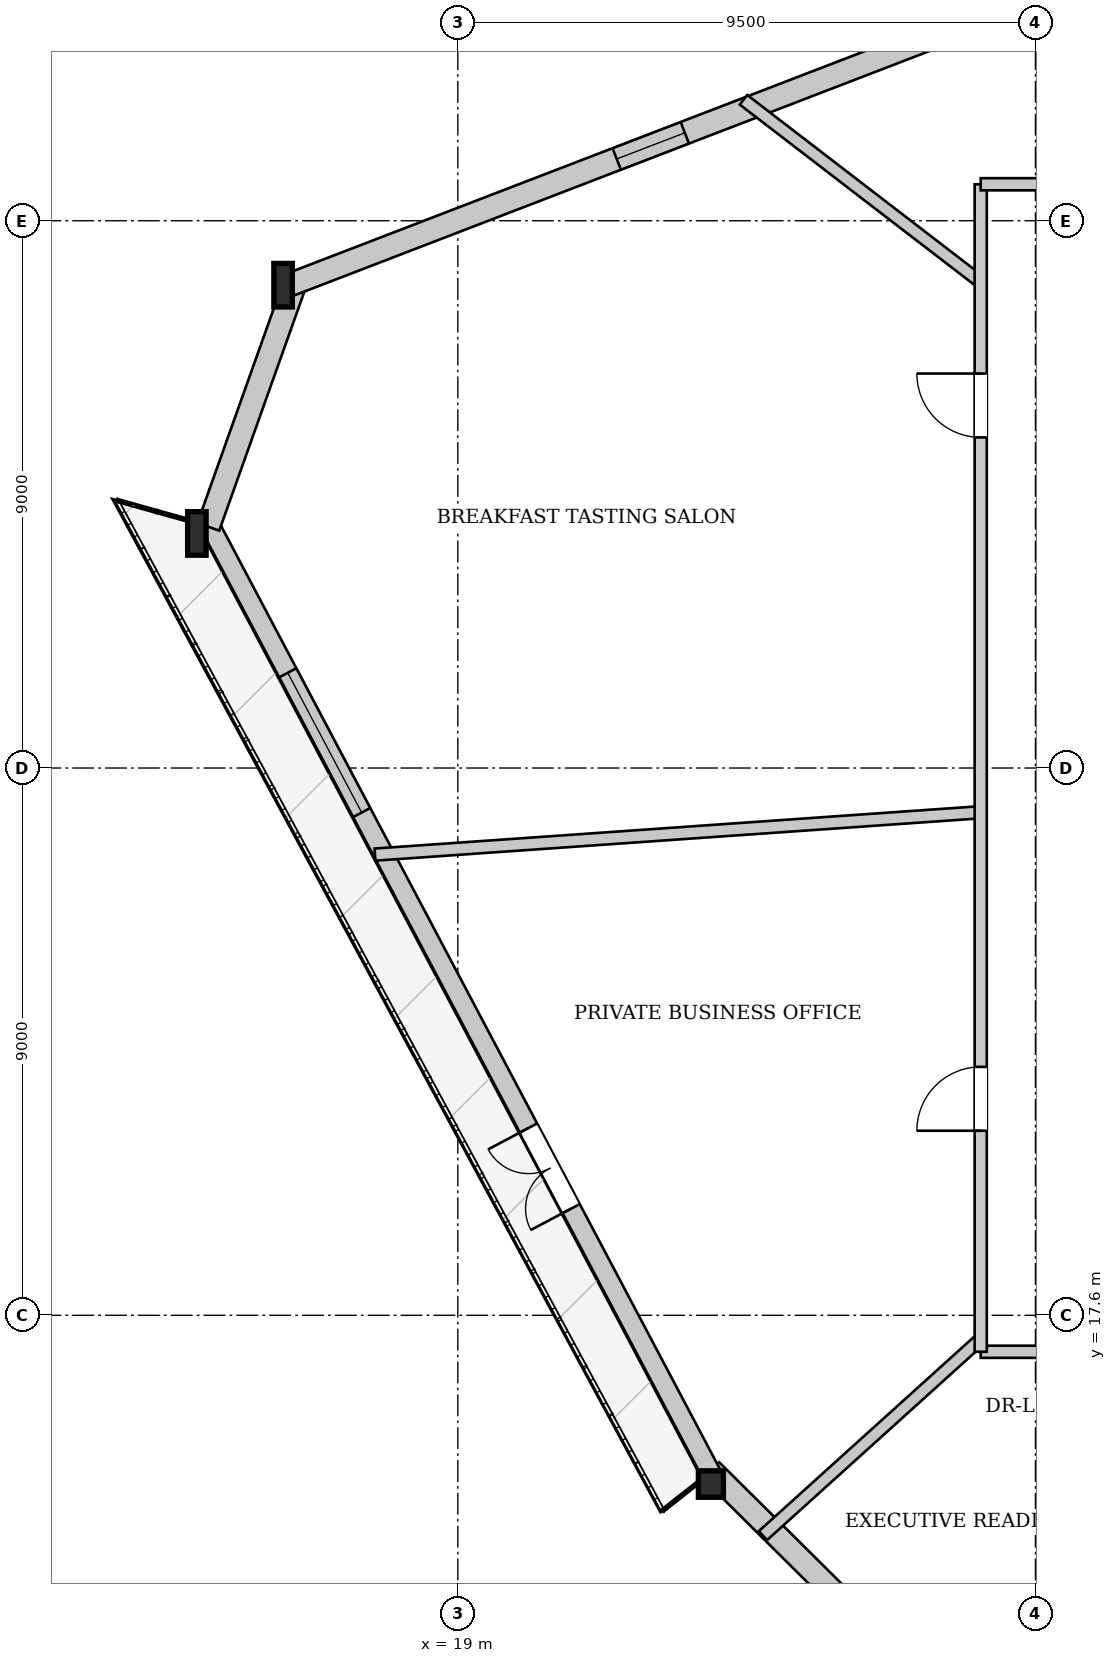
"""IFC4 building model, lengths in metres.
Left out: names, types, materials, properties, quantities, classifications, styles, units other than length and angle.
Written with IfcOpenShell. Run it as: python <this file> out.ifc"""

import sys

from ifc_helpers import new_model, si_unit, direction, frame, frame_2d, origin, origin_2d, place, context, subcontext, project, spatial, rectangle, i_section, extrude, source, transform, mapped, element, fill, save


model = new_model("IFC4")
c1 = context("Model", 3, precision=1e-05, world=origin(), true_north=direction((0.0, 1.0)))
c2 = subcontext(c1, "Body", "Model", "MODEL_VIEW")
j1 = project(units=[si_unit("LENGTHUNIT", "METRE"), si_unit("PLANEANGLEUNIT", "RADIAN")], contexts=[c1])
p1 = place(None, origin())
s1 = spatial("IfcSite", under=j1, at=p1, CompositionType="ELEMENT")
p2 = place(p1, origin())
s2 = spatial("IfcBuilding", under=s1, at=p2, CompositionType="ELEMENT")
p3 = place(p2, frame((0.0, 0.0, 189.2)))
s3 = spatial("IfcBuildingStorey", under=s2, at=p3, CompositionType="ELEMENT", Elevation=189.2)
m1 = source(origin(), c2, "Body", "SweptSolid", [
    extrude(i_section(OverallWidth=0.412, OverallDepth=0.435, WebThickness=0.031, FlangeThickness=0.05, at=origin_2d()), origin(), (0.0, 0.0, 1.0), 3.397),
])
p4 = place(p3, frame((26.763, 38.8, 0.0), z_axis=(-0.050587437703, -0.069485869686, 0.996299465553), x_axis=(0.808446763279, -0.58856930853, 0.0)))
e1 = element("IfcColumn", 1, at=p4, inside=s3, PredefinedType="COLUMN", context=c2, shape_type="MappedRepresentation", body=[
    mapped(m1, transform((0.0, 0.0, 0.0), x_axis=(1.0, 0.0, 0.0), y_axis=(0.0, 1.0, 0.0), z_axis=(0.0, 0.0, 1.0), scale=1.0)),
])
m2 = source(origin(), c2, "Body", "SweptSolid", [
    extrude(i_section(OverallWidth=0.304, OverallDepth=0.716, WebThickness=0.021, FlangeThickness=0.04, at=origin_2d()), origin(), (0.0, 0.0, 1.0), 3.407),
])
p5 = place(p3, frame((16.177, 34.727, 0.0), z_axis=(-0.02987997958, -0.109918198262, 0.993491407367), x_axis=(0.964981243116, -0.26231889073, 0.0)))
e2 = element("IfcColumn", 2, at=p5, inside=s3, PredefinedType="COLUMN", context=c2, shape_type="MappedRepresentation", body=[
    mapped(m2, transform((0.0, 0.0, 0.0), x_axis=(1.0, 0.0, 0.0), y_axis=(0.0, 1.0, 0.0), z_axis=(0.0, 0.0, 1.0), scale=1.0)),
])
m3 = source(origin(), c2, "Body", "SweptSolid", [
    extrude(i_section(OverallWidth=0.304, OverallDepth=0.716, WebThickness=0.021, FlangeThickness=0.04, at=origin_2d()), origin(), (0.0, 0.0, 1.0), 3.403),
])
p6 = place(p3, frame((14.719, 30.631, 0.0), z_axis=(-0.005955083855, -0.101810409526, 0.994785995824), x_axis=(0.998293726081, -0.058392092505, 0.0)))
e3 = element("IfcColumn", 3, at=p6, inside=s3, PredefinedType="COLUMN", context=c2, shape_type="MappedRepresentation", body=[
    mapped(m3, transform((0.0, 0.0, 0.0), x_axis=(1.0, 0.0, 0.0), y_axis=(0.0, 1.0, 0.0), z_axis=(0.0, 0.0, 1.0), scale=1.0)),
])
m4 = source(origin(), c2, "Body", "SweptSolid", [
    extrude(i_section(OverallWidth=0.412, OverallDepth=0.435, WebThickness=0.031, FlangeThickness=0.05, at=origin_2d()), origin(), (0.0, 0.0, 1.0), 3.399),
])
p7 = place(p3, frame((23.033, 14.912, 0.0), z_axis=(0.076270435651, -0.051565134461, 0.99575290989), x_axis=(0.560088984388, 0.828432453231, 0.0)))
e4 = element("IfcColumn", 4, at=p7, inside=s3, PredefinedType="COLUMN", context=c2, shape_type="MappedRepresentation", body=[
    mapped(m4, transform((0.0, 0.0, 0.0), x_axis=(1.0, 0.0, 0.0), y_axis=(0.0, 1.0, 0.0), z_axis=(0.0, 0.0, 1.0), scale=1.0)),
])
p8 = place(p3, frame((35.79, 2.523, 0.0), z_axis=(0.0, 0.0, 1.0), x_axis=(-0.709902124229, 0.704300343614, 0.0)))
e5 = element("IfcWall", 5, at=p8, inside=s3, PredefinedType="SOLIDWALL", context=c2, shape_type="SweptSolid", body=[
    extrude(rectangle(XDim=17.782, YDim=0.38, at=frame_2d((8.891, 0.0))), origin(), (0.0, 0.0, 1.0), 2.722),
])
p9 = place(p8, frame((3.929, 0.0, 0.65)))
e6 = element("IfcOpeningElement", 6, at=p9, cuts=e5, PredefinedType="OPENING", context=c2, shape_type="SweptSolid", body=[
    extrude(rectangle(XDim=1.2, YDim=1.5, at=frame_2d((0.6, 0.75))), frame((0.0, 0.2, 0.0), z_axis=(0.0, -1.0, 0.0), x_axis=(1.0, 0.0, 0.0)), (0.0, 0.0, 1.0), 0.4),
])
p10 = place(p8, frame((12.203, 0.0, 0.65)))
e7 = element("IfcOpeningElement", 7, at=p10, cuts=e5, PredefinedType="OPENING", context=c2, shape_type="SweptSolid", body=[
    extrude(rectangle(XDim=1.2, YDim=1.5, at=frame_2d((0.6, 0.75))), frame((0.0, 0.2, 0.0), z_axis=(0.0, -1.0, 0.0), x_axis=(1.0, 0.0, 0.0)), (0.0, 0.0, 1.0), 0.4),
])
p11 = place(p3, frame((23.174, 14.987, 0.0), z_axis=(0.0, 0.0, 1.0), x_axis=(-0.467564707415, 0.883958847673, 0.0)))
e8 = element("IfcWall", 8, at=p11, inside=s3, PredefinedType="SOLIDWALL", context=c2, shape_type="SweptSolid", body=[
    extrude(rectangle(XDim=17.782, YDim=0.32, at=frame_2d((8.891, 0.0))), origin(), (0.0, 0.0, 1.0), 2.722),
])
p12 = place(p11, frame((4.94, 0.0, 0.0)))
e9 = element("IfcOpeningElement", 9, at=p12, cuts=e8, PredefinedType="OPENING", context=c2, shape_type="SweptSolid", body=[
    extrude(rectangle(XDim=1.5, YDim=2.3, at=frame_2d((0.75, 1.15))), frame((0.0, 0.17, 0.0), z_axis=(0.0, -1.0, 0.0), x_axis=(1.0, 0.0, 0.0)), (0.0, 0.0, 1.0), 0.34),
])
p13 = place(p11, frame((12.309, 0.0, 0.252)))
e10 = element("IfcOpeningElement", 10, at=p13, cuts=e8, PredefinedType="OPENING", context=c2, shape_type="SweptSolid", body=[
    extrude(rectangle(XDim=2.6, YDim=2.35, at=frame_2d((1.3, 1.175))), frame((0.0, 0.17, 0.0), z_axis=(0.0, -1.0, 0.0), x_axis=(1.0, 0.0, 0.0)), (0.0, 0.0, 1.0), 0.34),
])
p14 = place(p3, frame((14.897, 30.567, 0.0), z_axis=(0.0, 0.0, 1.0), x_axis=(0.335397298071, 0.942076776302, 0.0)))
e11 = element("IfcWall", 11, at=p14, inside=s3, PredefinedType="SOLIDWALL", context=c2, shape_type="SweptSolid", body=[
    extrude(rectangle(XDim=4.349, YDim=0.38, at=frame_2d((2.174, 0.0))), origin(), (0.0, 0.0, 1.0), 2.722),
])
p15 = place(p3, frame((16.245, 34.55, 0.0), z_axis=(0.0, 0.0, 1.0), x_axis=(0.933308155782, 0.359076435249, 0.0)))
e12 = element("IfcWall", 12, at=p15, inside=s3, PredefinedType="SOLIDWALL", context=c2, shape_type="SweptSolid", body=[
    extrude(rectangle(XDim=22.685, YDim=0.38, at=frame_2d((11.343, 0.0))), origin(), (0.0, 0.0, 1.0), 2.722),
])
p16 = place(p15, frame((5.752, 0.0, 0.65)))
e13 = element("IfcOpeningElement", 13, at=p16, cuts=e12, PredefinedType="OPENING", context=c2, shape_type="SweptSolid", body=[
    extrude(rectangle(XDim=1.2, YDim=1.5, at=frame_2d((0.6, 0.75))), frame((0.0, 0.2, 0.0), z_axis=(0.0, -1.0, 0.0), x_axis=(1.0, 0.0, 0.0)), (0.0, 0.0, 1.0), 0.4),
])
p17 = place(p15, frame((15.733, 0.0, 0.65)))
e14 = element("IfcOpeningElement", 14, at=p17, cuts=e12, PredefinedType="OPENING", context=c2, shape_type="SweptSolid", body=[
    extrude(rectangle(XDim=1.2, YDim=1.5, at=frame_2d((0.6, 0.75))), frame((0.0, 0.2, 0.0), z_axis=(0.0, -1.0, 0.0), x_axis=(1.0, 0.0, 0.0)), (0.0, 0.0, 1.0), 0.4),
])
p18 = place(p3, frame((27.6, 34.591, 0.0), z_axis=(0.0, 0.0, 1.0), x_axis=(-0.792943004207, 0.609295816562, 0.0)))
e15 = element("IfcWall", 15, at=p18, inside=s3, PredefinedType="PARTITIONING", context=c2, shape_type="SweptSolid", body=[
    extrude(rectangle(XDim=4.92, YDim=0.2, at=frame_2d((2.46, 0.0))), origin(), (0.0, 0.0, 1.0), 3.33),
])
p19 = place(p3, frame((27.6, 25.873, 0.0), z_axis=(0.0, 0.0, 1.0), x_axis=(-0.997563086445, -0.069770255568, 0.0)))
e16 = element("IfcWall", 16, at=p19, inside=s3, PredefinedType="PARTITIONING", context=c2, shape_type="SweptSolid", body=[
    extrude(rectangle(XDim=9.987, YDim=0.2, at=frame_2d((4.993, 0.0))), origin(), (0.0, 0.0, 1.0), 3.33),
])
p20 = place(p3, frame((27.6, 17.21, 0.0), z_axis=(0.0, 0.0, 1.0), x_axis=(-0.742259303299, -0.670112771603, 0.0)))
e17 = element("IfcWall", 17, at=p20, inside=s3, PredefinedType="PARTITIONING", context=c2, shape_type="SweptSolid", body=[
    extrude(rectangle(XDim=4.825, YDim=0.2, at=frame_2d((2.413, 0.0))), origin(), (0.0, 0.0, 1.0), 3.33),
])
p21 = place(p3, frame((27.6, 17.0, 0.0), z_axis=(0.0, 0.0, 1.0), x_axis=(1.0, 0.0, 0.0)))
e18 = element("IfcWall", 18, at=p21, inside=s3, PredefinedType="PARTITIONING", context=c2, shape_type="SweptSolid", body=[
    extrude(rectangle(XDim=20.8, YDim=0.2, at=frame_2d((10.4, 0.0))), origin(), (0.0, 0.0, 1.0), 3.33),
])
p22 = place(p21, frame((8.164, 0.0, 0.0)))
e19 = element("IfcOpeningElement", 19, at=p22, cuts=e18, PredefinedType="OPENING", context=c2, shape_type="SweptSolid", body=[
    extrude(rectangle(XDim=1.05, YDim=2.2, at=frame_2d((0.525, 1.1))), frame((0.0, 0.11, 0.0), z_axis=(0.0, -1.0, 0.0), x_axis=(1.0, 0.0, 0.0)), (0.0, 0.0, 1.0), 0.22),
])
p23 = place(p21, frame((15.317, 0.0, 0.0)))
e20 = element("IfcOpeningElement", 20, at=p23, cuts=e18, PredefinedType="OPENING", context=c2, shape_type="SweptSolid", body=[
    extrude(rectangle(XDim=1.05, YDim=2.2, at=frame_2d((0.525, 1.1))), frame((0.0, 0.11, 0.0), z_axis=(0.0, -1.0, 0.0), x_axis=(1.0, 0.0, 0.0)), (0.0, 0.0, 1.0), 0.22),
])
p24 = place(p21, frame((1.25, 0.0, 0.0)))
e21 = element("IfcOpeningElement", 21, at=p24, cuts=e18, PredefinedType="OPENING", context=c2, shape_type="SweptSolid", body=[
    extrude(rectangle(XDim=1.05, YDim=2.2, at=frame_2d((0.525, 1.1))), frame((0.0, 0.11, 0.0), z_axis=(0.0, -1.0, 0.0), x_axis=(1.0, 0.0, 0.0)), (0.0, 0.0, 1.0), 0.22),
])
p25 = place(p3, frame((27.6, 17.0, 0.0), z_axis=(0.0, 0.0, 1.0), x_axis=(0.0, 1.0, 0.0)))
e22 = element("IfcWall", 22, at=p25, inside=s3, PredefinedType="PARTITIONING", context=c2, shape_type="SweptSolid", body=[
    extrude(rectangle(XDim=19.2, YDim=0.2, at=frame_2d((9.6, 0.0))), origin(), (0.0, 0.0, 1.0), 3.33),
])
p26 = place(p25, frame((15.037, 0.0, 0.0)))
e23 = element("IfcOpeningElement", 23, at=p26, cuts=e22, PredefinedType="OPENING", context=c2, shape_type="SweptSolid", body=[
    extrude(rectangle(XDim=1.05, YDim=2.2, at=frame_2d((0.525, 1.1))), frame((0.0, 0.11, 0.0), z_axis=(0.0, -1.0, 0.0), x_axis=(1.0, 0.0, 0.0)), (0.0, 0.0, 1.0), 0.22),
])
p27 = place(p25, frame((3.635, 0.0, 0.0)))
e24 = element("IfcOpeningElement", 24, at=p27, cuts=e22, PredefinedType="OPENING", context=c2, shape_type="SweptSolid", body=[
    extrude(rectangle(XDim=1.05, YDim=2.2, at=frame_2d((0.525, 1.1))), frame((0.0, 0.11, 0.0), z_axis=(0.0, -1.0, 0.0), x_axis=(1.0, 0.0, 0.0)), (0.0, 0.0, 1.0), 0.22),
])
p28 = place(p3, frame((27.6, 36.2, 0.0), z_axis=(0.0, 0.0, 1.0), x_axis=(1.0, 0.0, 0.0)))
e25 = element("IfcWall", 25, at=p28, inside=s3, PredefinedType="PARTITIONING", context=c2, shape_type="SweptSolid", body=[
    extrude(rectangle(XDim=13.4, YDim=0.2, at=frame_2d((6.7, 0.0))), origin(), (0.0, 0.0, 1.0), 3.33),
])
p29 = place(p28, frame((12.05, 0.0, 0.0)))
e26 = element("IfcOpeningElement", 26, at=p29, cuts=e25, PredefinedType="OPENING", context=c2, shape_type="SweptSolid", body=[
    extrude(rectangle(XDim=1.05, YDim=2.2, at=frame_2d((0.525, 1.1))), frame((0.0, 0.11, 0.0), z_axis=(0.0, -1.0, 0.0), x_axis=(1.0, 0.0, 0.0)), (0.0, 0.0, 1.0), 0.22),
])
p30 = place(p28, frame((4.401, 0.0, 0.0)))
e27 = element("IfcOpeningElement", 27, at=p30, cuts=e25, PredefinedType="OPENING", context=c2, shape_type="SweptSolid", body=[
    extrude(rectangle(XDim=1.05, YDim=2.2, at=frame_2d((0.525, 1.1))), frame((0.0, 0.11, 0.0), z_axis=(0.0, -1.0, 0.0), x_axis=(1.0, 0.0, 0.0)), (0.0, 0.0, 1.0), 0.22),
])
m5 = source(origin(), c2, "Body", "SweptSolid", [
    extrude(rectangle(XDim=1.5, YDim=2.3, at=frame_2d((0.75, 1.15))), frame((0.0, 0.025, 0.0), z_axis=(0.0, -1.0, 0.0), x_axis=(1.0, 0.0, 0.0)), (0.0, 0.0, 1.0), 0.05),
])
p31 = place(p12, origin())
e28 = element("IfcDoor", 28, at=p31, inside=s3, OperationType="DOUBLE_DOOR_SINGLE_SWING", PredefinedType="DOOR", context=c2, shape_type="MappedRepresentation", body=[
    mapped(m5, transform((0.0, 0.0, 0.0), x_axis=(1.0, 0.0, 0.0), y_axis=(0.0, 1.0, 0.0), z_axis=(0.0, 0.0, 1.0), scale=1.0)),
])
fill(e9, e28)
m6 = source(origin(), c2, "Body", "SweptSolid", [
    extrude(rectangle(XDim=2.6, YDim=2.35, at=frame_2d((1.3, 1.175))), frame((0.0, 0.03, 0.0), z_axis=(0.0, -1.0, 0.0), x_axis=(1.0, 0.0, 0.0)), (0.0, 0.0, 1.0), 0.06),
])
p32 = place(p13, origin())
e29 = element("IfcWindow", 29, at=p32, inside=s3, PartitioningType="SINGLE_PANEL", PredefinedType="WINDOW", context=c2, shape_type="MappedRepresentation", body=[
    mapped(m6, transform((0.0, 0.0, 0.0), x_axis=(1.0, 0.0, 0.0), y_axis=(0.0, 1.0, 0.0), z_axis=(0.0, 0.0, 1.0), scale=1.0)),
])
fill(e10, e29)
m7 = source(origin(), c2, "Body", "SweptSolid", [
    extrude(rectangle(XDim=1.2, YDim=1.5, at=frame_2d((0.6, 0.75))), frame((0.0, 0.03, 0.0), z_axis=(0.0, -1.0, 0.0), x_axis=(1.0, 0.0, 0.0)), (0.0, 0.0, 1.0), 0.06),
])
p33 = place(p16, origin())
e30 = element("IfcWindow", 30, at=p33, inside=s3, PartitioningType="SINGLE_PANEL", PredefinedType="WINDOW", context=c2, shape_type="MappedRepresentation", body=[
    mapped(m7, transform((0.0, 0.0, 0.0), x_axis=(1.0, 0.0, 0.0), y_axis=(0.0, 1.0, 0.0), z_axis=(0.0, 0.0, 1.0), scale=1.0)),
])
fill(e13, e30)
m8 = source(origin(), c2, "Body", "SweptSolid", [
    extrude(rectangle(XDim=1.05, YDim=2.2, at=frame_2d((0.525, 1.1))), frame((0.0, 0.025, 0.0), z_axis=(0.0, -1.0, 0.0), x_axis=(1.0, 0.0, 0.0)), (0.0, 0.0, 1.0), 0.05),
])
p34 = place(p26, origin())
e31 = element("IfcDoor", 31, at=p34, inside=s3, OperationType="SINGLE_SWING_RIGHT", PredefinedType="DOOR", context=c2, shape_type="MappedRepresentation", body=[
    mapped(m8, transform((0.0, 0.0, 0.0), x_axis=(1.0, 0.0, 0.0), y_axis=(0.0, 1.0, 0.0), z_axis=(0.0, 0.0, 1.0), scale=1.0)),
])
fill(e23, e31)
p35 = place(p27, origin())
e32 = element("IfcDoor", 32, at=p35, inside=s3, OperationType="SINGLE_SWING_LEFT", PredefinedType="DOOR", context=c2, shape_type="MappedRepresentation", body=[
    mapped(m8, transform((0.0, 0.0, 0.0), x_axis=(1.0, 0.0, 0.0), y_axis=(0.0, 1.0, 0.0), z_axis=(0.0, 0.0, 1.0), scale=1.0)),
])
fill(e24, e32)
save(model, sys.argv[1])
